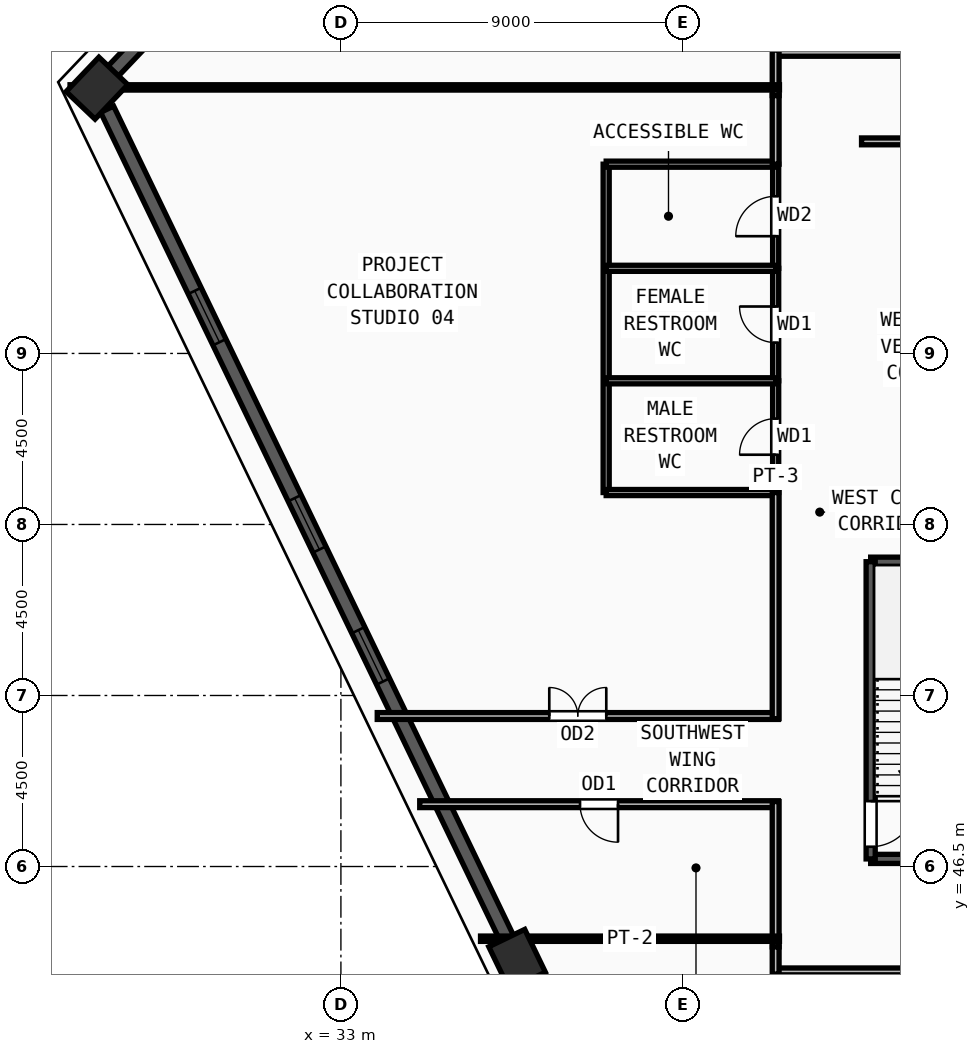
"""IFC4 building model, lengths in metres.
Left out: names, types, materials, properties, quantities, classifications, styles, units other than length and angle.
Written with IfcOpenShell. Run it as: python <this file> out.ifc"""

import sys

from ifc_helpers import new_model, si_unit, direction, frame, frame_2d, origin, origin_2d, place, context, subcontext, project, spatial, rectangle, extrude, source, transform, mapped, element, fill, save


model = new_model("IFC4")
c1 = context("Model", 3, precision=1e-05, world=origin(), true_north=direction((0.0, 1.0)))
c2 = subcontext(c1, "Body", "Model", "MODEL_VIEW")
j1 = project(units=[si_unit("LENGTHUNIT", "METRE"), si_unit("PLANEANGLEUNIT", "RADIAN")], contexts=[c1])
p1 = place(None, origin())
s1 = spatial("IfcSite", under=j1, at=p1, CompositionType="ELEMENT")
p2 = place(p1, origin())
s2 = spatial("IfcBuilding", under=s1, at=p2, CompositionType="ELEMENT")
p3 = place(p2, frame((0.0, 0.0, 213.0)))
s3 = spatial("IfcBuildingStorey", under=s2, at=p3, CompositionType="ELEMENT", Elevation=213.0)
m1 = source(origin(), c2, "Body", "SweptSolid", [
    extrude(rectangle(XDim=1.25, YDim=1.05, at=origin_2d()), origin(), (0.0, 0.0, 1.0), 3.75),
])
for number, where, z_axis, x_axis in (
    (1, (37.636, 44.054, 0.0), (0.0, 0.0, 1.0), (-0.434, 0.901, 0.0)),
    (2, (26.581, 66.98, 0.0), (0.0, 0.0, 1.0), (0.689, 0.724, 0.0)),
):
    element("IfcColumn", number, at=place(p3, frame(where, z_axis=z_axis, x_axis=x_axis)), inside=s3, PredefinedType="COLUMN", context=c2, shape_type="MappedRepresentation", body=[
        mapped(m1, transform((0.0, 0.0, 0.0), x_axis=(1.0, 0.0, 0.0), y_axis=(0.0, 1.0, 0.0), z_axis=(0.0, 0.0, 1.0), scale=1.0)),
    ])
p4 = place(p3, frame((30.035, 70.609, 0.0), z_axis=(0.0, 0.0, 1.0), x_axis=(-0.689503947634, -0.724281924527, 0.0)))
e3 = element("IfcWall", 3, at=p4, inside=s3, PredefinedType="SOLIDWALL", context=c2, shape_type="SweptSolid", body=[
    extrude(rectangle(XDim=4.395, YDim=0.38, at=frame_2d((2.197, 0.0))), origin(), (0.0, 0.0, 1.0), 3.57),
])
m2 = source(origin(), c2, "Body", "SweptSolid", [
    extrude(rectangle(XDim=1.2, YDim=1.9, at=frame_2d((0.6, 0.95))), frame((0.0, 0.2, 0.0), z_axis=(0.0, -1.0, 0.0), x_axis=(1.0, 0.0, 0.0)), (0.0, 0.0, 1.0), 0.4),
])
p5 = place(p4, frame((1.597, 0.0, 0.55)))
e4 = element("IfcOpeningElement", 4, at=p5, cuts=e3, PredefinedType="OPENING", context=c2, shape_type="MappedRepresentation", body=[
    mapped(m2, transform((0.0, 0.0, 0.0), x_axis=(1.0, 0.0, 0.0), y_axis=(0.0, 1.0, 0.0), z_axis=(0.0, 0.0, 1.0), scale=1.0)),
])
p6 = place(p3, frame((26.848, 66.426, 0.0), z_axis=(0.0, 0.0, 1.0), x_axis=(0.434351028037, -0.900743684099, 0.0)))
e5 = element("IfcWall", 5, at=p6, inside=s3, PredefinedType="SOLIDWALL", context=c2, shape_type="SweptSolid", body=[
    extrude(rectangle(XDim=24.222, YDim=0.38, at=frame_2d((12.111, 0.0))), origin(), (0.0, 0.0, 1.0), 3.57),
])
m3 = source(origin(), c2, "Body", "SweptSolid", [
    extrude(rectangle(XDim=1.5, YDim=1.9, at=frame_2d((0.75, 0.95))), frame((0.0, 0.2, 0.0), z_axis=(0.0, -1.0, 0.0), x_axis=(1.0, 0.0, 0.0)), (0.0, 0.0, 1.0), 0.4),
])
p7 = place(p6, frame((5.306, 0.0, 0.55)))
e6 = element("IfcOpeningElement", 6, at=p7, cuts=e5, PredefinedType="OPENING", context=c2, shape_type="MappedRepresentation", body=[
    mapped(m3, transform((0.0, 0.0, 0.0), x_axis=(1.0, 0.0, 0.0), y_axis=(0.0, 1.0, 0.0), z_axis=(0.0, 0.0, 1.0), scale=1.0)),
])
p8 = place(p6, frame((11.361, 0.0, 0.55)))
e7 = element("IfcOpeningElement", 7, at=p8, cuts=e5, PredefinedType="OPENING", context=c2, shape_type="MappedRepresentation", body=[
    mapped(m3, transform((0.0, 0.0, 0.0), x_axis=(1.0, 0.0, 0.0), y_axis=(0.0, 1.0, 0.0), z_axis=(0.0, 0.0, 1.0), scale=1.0)),
])
p9 = place(p6, frame((15.217, 0.0, 0.55)))
e8 = element("IfcOpeningElement", 8, at=p9, cuts=e5, PredefinedType="OPENING", context=c2, shape_type="MappedRepresentation", body=[
    mapped(m3, transform((0.0, 0.0, 0.0), x_axis=(1.0, 0.0, 0.0), y_axis=(0.0, 1.0, 0.0), z_axis=(0.0, 0.0, 1.0), scale=1.0)),
])
for number, where, z_axis, x_axis in (
    (9, (46.94, 46.7, 0.0), (0.0, 0.0, 1.0), (1.0, 0.0, 0.0)),
    (10, (50.38, 54.52, 0.0), (0.0, 0.0, 1.0), (-1.0, 0.0, 0.0)),
):
    element("IfcWall", number, at=place(p3, frame(where, z_axis=z_axis, x_axis=x_axis)), inside=s3, PredefinedType="SOLIDWALL", context=c2, shape_type="SweptSolid", body=[
        extrude(rectangle(XDim=3.44, YDim=0.24, at=frame_2d((1.72, 0.0))), origin(), (0.0, 0.0, 1.0), 3.57),
    ])
p10 = place(p3, frame((46.94, 54.52, 0.0), z_axis=(0.0, 0.0, 1.0), x_axis=(0.0, -1.0, 0.0)))
e11 = element("IfcWall", 11, at=p10, inside=s3, PredefinedType="SOLIDWALL", context=c2, shape_type="SweptSolid", body=[
    extrude(rectangle(XDim=7.82, YDim=0.24, at=frame_2d((3.91, 0.0))), origin(), (0.0, 0.0, 1.0), 3.57),
])
m4 = source(origin(), c2, "Body", "SweptSolid", [
    extrude(rectangle(XDim=1.2, YDim=2.2, at=frame_2d((0.6, 1.1))), frame((0.0, 0.13, 0.0), z_axis=(0.0, -1.0, 0.0), x_axis=(1.0, 0.0, 0.0)), (0.0, 0.0, 1.0), 0.26),
])
p11 = place(p10, frame((6.3, 0.0, 0.0)))
e12 = element("IfcOpeningElement", 12, at=p11, cuts=e11, PredefinedType="OPENING", context=c2, shape_type="MappedRepresentation", body=[
    mapped(m4, transform((0.0, 0.0, 0.0), x_axis=(1.0, 0.0, 0.0), y_axis=(0.0, 1.0, 0.0), z_axis=(0.0, 0.0, 1.0), scale=1.0)),
])
p12 = place(p3, frame((44.44, 56.34, 0.0), z_axis=(0.0, 0.0, 1.0), x_axis=(0.0, 1.0, 0.0)))
e13 = element("IfcWall", 13, at=p12, inside=s3, PredefinedType="PARTITIONING", context=c2, shape_type="SweptSolid", body=[
    extrude(rectangle(XDim=2.94, YDim=0.16, at=frame_2d((1.47, 0.0))), origin(), (0.0, 0.0, 1.0), 3.57),
])
m5 = source(origin(), c2, "Body", "SweptSolid", [
    extrude(rectangle(XDim=0.95, YDim=2.15, at=frame_2d((0.475, 1.075))), frame((0.0, 0.09, 0.0), z_axis=(0.0, -1.0, 0.0), x_axis=(1.0, 0.0, 0.0)), (0.0, 0.0, 1.0), 0.18),
])
p13 = place(p12, frame((0.995, 0.0, 0.0)))
e14 = element("IfcOpeningElement", 14, at=p13, cuts=e13, PredefinedType="OPENING", context=c2, shape_type="MappedRepresentation", body=[
    mapped(m5, transform((0.0, 0.0, 0.0), x_axis=(1.0, 0.0, 0.0), y_axis=(0.0, 1.0, 0.0), z_axis=(0.0, 0.0, 1.0), scale=1.0)),
])
p14 = place(p3, frame((44.44, 59.28, 0.0), z_axis=(0.0, 0.0, 1.0), x_axis=(0.0, 1.0, 0.0)))
e15 = element("IfcWall", 15, at=p14, inside=s3, PredefinedType="PARTITIONING", context=c2, shape_type="SweptSolid", body=[
    extrude(rectangle(XDim=2.96, YDim=0.16, at=frame_2d((1.48, 0.0))), origin(), (0.0, 0.0, 1.0), 3.57),
])
p15 = place(p14, frame((1.005, 0.0, 0.0)))
e16 = element("IfcOpeningElement", 16, at=p15, cuts=e15, PredefinedType="OPENING", context=c2, shape_type="MappedRepresentation", body=[
    mapped(m5, transform((0.0, 0.0, 0.0), x_axis=(1.0, 0.0, 0.0), y_axis=(0.0, 1.0, 0.0), z_axis=(0.0, 0.0, 1.0), scale=1.0)),
])
p16 = place(p3, frame((44.44, 62.24, 0.0), z_axis=(0.0, 0.0, 1.0), x_axis=(0.0, 1.0, 0.0)))
e17 = element("IfcWall", 17, at=p16, inside=s3, PredefinedType="PARTITIONING", context=c2, shape_type="SweptSolid", body=[
    extrude(rectangle(XDim=2.74, YDim=0.16, at=frame_2d((1.37, 0.0))), origin(), (0.0, 0.0, 1.0), 3.57),
])
m6 = source(origin(), c2, "Body", "SweptSolid", [
    extrude(rectangle(XDim=1.05, YDim=2.15, at=frame_2d((0.525, 1.075))), frame((0.0, 0.09, 0.0), z_axis=(0.0, -1.0, 0.0), x_axis=(1.0, 0.0, 0.0)), (0.0, 0.0, 1.0), 0.18),
])
p17 = place(p16, frame((0.845, 0.0, 0.0)))
e18 = element("IfcOpeningElement", 18, at=p17, cuts=e17, PredefinedType="OPENING", context=c2, shape_type="MappedRepresentation", body=[
    mapped(m6, transform((0.0, 0.0, 0.0), x_axis=(1.0, 0.0, 0.0), y_axis=(0.0, 1.0, 0.0), z_axis=(0.0, 0.0, 1.0), scale=1.0)),
])
p18 = place(p3, frame((46.7, 65.58, 0.0), z_axis=(0.0, 0.0, 1.0), x_axis=(1.0, 0.0, 0.0)))
e19 = element("IfcWall", 19, at=p18, inside=s3, PredefinedType="PARTITIONING", context=c2, shape_type="SweptSolid", body=[
    extrude(rectangle(XDim=3.84, YDim=0.18, at=frame_2d((1.92, 0.0))), origin(), (0.0, 0.0, 1.0), 3.57),
])
m7 = source(origin(), c2, "Body", "SweptSolid", [
    extrude(rectangle(XDim=1.3, YDim=2.2, at=frame_2d((0.65, 1.1))), frame((0.0, 0.1, 0.0), z_axis=(0.0, -1.0, 0.0), x_axis=(1.0, 0.0, 0.0)), (0.0, 0.0, 1.0), 0.2),
])
p19 = place(p18, frame((1.27, 0.0, 0.0)))
e20 = element("IfcOpeningElement", 20, at=p19, cuts=e19, PredefinedType="OPENING", context=c2, shape_type="MappedRepresentation", body=[
    mapped(m7, transform((0.0, 0.0, 0.0), x_axis=(1.0, 0.0, 0.0), y_axis=(0.0, 1.0, 0.0), z_axis=(0.0, 0.0, 1.0), scale=1.0)),
])
p20 = place(p3, frame((44.37, 67.91, 0.0), z_axis=(0.0, 0.0, 1.0), x_axis=(1.0, 0.0, 0.0)))
e21 = element("IfcWall", 21, at=p20, inside=s3, PredefinedType="PARTITIONING", context=c2, shape_type="SweptSolid", body=[
    extrude(rectangle(XDim=18.84, YDim=0.18, at=frame_2d((9.42, 0.0))), origin(), (0.0, 0.0, 1.0), 3.57),
])
m8 = source(origin(), c2, "Body", "SweptSolid", [
    extrude(rectangle(XDim=1.5, YDim=2.2, at=frame_2d((0.75, 1.1))), frame((0.0, 0.1, 0.0), z_axis=(0.0, -1.0, 0.0), x_axis=(1.0, 0.0, 0.0)), (0.0, 0.0, 1.0), 0.2),
])
p21 = place(p20, frame((8.67, 0.0, 0.0)))
e22 = element("IfcOpeningElement", 22, at=p21, cuts=e21, PredefinedType="OPENING", context=c2, shape_type="MappedRepresentation", body=[
    mapped(m8, transform((0.0, 0.0, 0.0), x_axis=(1.0, 0.0, 0.0), y_axis=(0.0, 1.0, 0.0), z_axis=(0.0, 0.0, 1.0), scale=1.0)),
])
p22 = place(p3, frame((33.956, 50.46, 0.0), z_axis=(0.0, 0.0, 1.0), x_axis=(1.0, 0.0, 0.0)))
e23 = element("IfcWall", 23, at=p22, inside=s3, PredefinedType="PARTITIONING", context=c2, shape_type="SweptSolid", body=[
    extrude(rectangle(XDim=10.554, YDim=0.18, at=frame_2d((5.277, 0.0))), origin(), (0.0, 0.0, 1.0), 3.57),
])
p23 = place(p22, frame((4.527, 0.0, 0.0)))
e24 = element("IfcOpeningElement", 24, at=p23, cuts=e23, PredefinedType="OPENING", context=c2, shape_type="MappedRepresentation", body=[
    mapped(m8, transform((0.0, 0.0, 0.0), x_axis=(1.0, 0.0, 0.0), y_axis=(0.0, 1.0, 0.0), z_axis=(0.0, 0.0, 1.0), scale=1.0)),
])
p24 = place(p3, frame((44.51, 48.14, 0.0), z_axis=(0.0, 0.0, 1.0), x_axis=(-1.0, 0.0, 0.0)))
e25 = element("IfcWall", 25, at=p24, inside=s3, PredefinedType="PARTITIONING", context=c2, shape_type="SweptSolid", body=[
    extrude(rectangle(XDim=9.436, YDim=0.18, at=frame_2d((4.718, 0.0))), origin(), (0.0, 0.0, 1.0), 3.57),
])
m9 = source(origin(), c2, "Body", "SweptSolid", [
    extrude(rectangle(XDim=1.0, YDim=2.2, at=frame_2d((0.5, 1.1))), frame((0.0, 0.1, 0.0), z_axis=(0.0, -1.0, 0.0), x_axis=(1.0, 0.0, 0.0)), (0.0, 0.0, 1.0), 0.2),
])
p25 = place(p24, frame((4.218, 0.0, 0.0)))
e26 = element("IfcOpeningElement", 26, at=p25, cuts=e25, PredefinedType="OPENING", context=c2, shape_type="MappedRepresentation", body=[
    mapped(m9, transform((0.0, 0.0, 0.0), x_axis=(1.0, 0.0, 0.0), y_axis=(0.0, 1.0, 0.0), z_axis=(0.0, 0.0, 1.0), scale=1.0)),
])
p26 = place(p3, frame((54.215, 43.74, 0.0), z_axis=(0.0, 0.0, 1.0), x_axis=(-1.0, 0.0, 0.0)))
e27 = element("IfcWall", 27, at=p26, inside=s3, PredefinedType="PARTITIONING", context=c2, shape_type="SweptSolid", body=[
    extrude(rectangle(XDim=9.845, YDim=0.18, at=frame_2d((4.922, 0.0))), origin(), (0.0, 0.0, 1.0), 3.57),
])
p27 = place(p26, frame((4.173, 0.0, 0.0)))
e28 = element("IfcOpeningElement", 28, at=p27, cuts=e27, PredefinedType="OPENING", context=c2, shape_type="MappedRepresentation", body=[
    mapped(m8, transform((0.0, 0.0, 0.0), x_axis=(1.0, 0.0, 0.0), y_axis=(0.0, 1.0, 0.0), z_axis=(0.0, 0.0, 1.0), scale=1.0)),
])
p28 = place(p3, frame((39.98, 56.34, 0.0), z_axis=(0.0, 0.0, 1.0), x_axis=(0.0, 1.0, 0.0)))
e29 = element("IfcWall", 29, at=p28, inside=s3, PredefinedType="PARTITIONING", context=c2, shape_type="SweptSolid", body=[
    extrude(rectangle(XDim=8.64, YDim=0.16, at=frame_2d((4.32, 0.0))), origin(), (0.0, 0.0, 1.0), 3.57),
])
for number, where, z_axis, x_axis in (
    (30, (39.98, 56.34, 0.0), (0.0, 0.0, 1.0), (1.0, 0.0, 0.0)),
    (31, (39.98, 59.28, 0.0), (0.0, 0.0, 1.0), (1.0, 0.0, 0.0)),
    (32, (39.98, 62.24, 0.0), (0.0, 0.0, 1.0), (1.0, 0.0, 0.0)),
    (33, (39.98, 64.98, 0.0), (0.0, 0.0, 1.0), (1.0, 0.0, 0.0)),
):
    element("IfcWall", number, at=place(p3, frame(where, z_axis=z_axis, x_axis=x_axis)), inside=s3, PredefinedType="PARTITIONING", context=c2, shape_type="SweptSolid", body=[
        extrude(rectangle(XDim=4.46, YDim=0.16, at=frame_2d((2.23, 0.0))), origin(), (0.0, 0.0, 1.0), 3.57),
    ])
p29 = place(p3, frame((44.44, 66.785, 0.0), z_axis=(0.0, 0.0, 1.0), x_axis=(0.0, 1.0, 0.0)))
e34 = element("IfcWall", 34, at=p29, inside=s3, PredefinedType="PARTITIONING", context=c2, shape_type="SweptSolid", body=[
    extrude(rectangle(XDim=1.195, YDim=0.18, at=frame_2d((0.598, 0.0))), origin(), (0.0, 0.0, 1.0), 3.57),
])
p30 = place(p3, frame((44.44, 50.39, 0.0), z_axis=(0.0, 0.0, 1.0), x_axis=(0.0, 1.0, 0.0)))
e35 = element("IfcWall", 35, at=p30, inside=s3, PredefinedType="PARTITIONING", context=c2, shape_type="SweptSolid", body=[
    extrude(rectangle(XDim=5.95, YDim=0.18, at=frame_2d((2.975, 0.0))), origin(), (0.0, 0.0, 1.0), 3.57),
])
p31 = place(p3, frame((44.44, 64.98, 0.0), z_axis=(0.0, 0.0, 1.0), x_axis=(0.0, 1.0, 0.0)))
e36 = element("IfcWall", 36, at=p31, inside=s3, PredefinedType="PARTITIONING", context=c2, shape_type="SweptSolid", body=[
    extrude(rectangle(XDim=1.805, YDim=0.18, at=frame_2d((0.902, 0.0))), origin(), (0.0, 0.0, 1.0), 3.57),
])
p32 = place(p3, frame((44.44, 44.385, 0.0), z_axis=(0.0, 0.0, 1.0), x_axis=(0.0, 1.0, 0.0)))
e37 = element("IfcWall", 37, at=p32, inside=s3, PredefinedType="PARTITIONING", context=c2, shape_type="SweptSolid", body=[
    extrude(rectangle(XDim=3.825, YDim=0.18, at=frame_2d((1.913, 0.0))), origin(), (0.0, 0.0, 1.0), 3.57),
])
p33 = place(p3, frame((44.44, 43.67, 0.0), z_axis=(0.0, 0.0, 1.0), x_axis=(0.0, 1.0, 0.0)))
e38 = element("IfcWall", 38, at=p33, inside=s3, PredefinedType="PARTITIONING", context=c2, shape_type="SweptSolid", body=[
    extrude(rectangle(XDim=0.715, YDim=0.18, at=frame_2d((0.357, 0.0))), origin(), (0.0, 0.0, 1.0), 3.57),
])
p34 = place(p3, frame((44.54, 44.6, 0.0), z_axis=(0.0, 0.0, 1.0), x_axis=(-1.0, 0.0, 0.0)))
e39 = element("IfcWall", 39, at=p34, inside=s3, PredefinedType="PARTITIONING", context=c2, shape_type="SweptSolid", body=[
    extrude(rectangle(XDim=7.866, YDim=0.14, at=frame_2d((3.933, 0.0))), origin(), (0.0, 0.0, 1.0), 3.57),
])
p35 = place(p3, frame((44.54, 67.0, 0.0), z_axis=(0.0, 0.0, 1.0), x_axis=(-1.0, 0.0, 0.0)))
e40 = element("IfcWall", 40, at=p35, inside=s3, PredefinedType="PARTITIONING", context=c2, shape_type="SweptSolid", body=[
    extrude(rectangle(XDim=18.668, YDim=0.14, at=frame_2d((9.334, 0.0))), origin(), (0.0, 0.0, 1.0), 2.855),
])
m10 = source(origin(), c2, "Body", "SweptSolid", [
    extrude(rectangle(XDim=1.5, YDim=1.9, at=frame_2d((0.75, 0.95))), frame((0.0, 0.03, 0.0), z_axis=(0.0, -1.0, 0.0), x_axis=(1.0, 0.0, 0.0)), (0.0, 0.0, 1.0), 0.06),
])
p36 = place(p7, origin())
e41 = element("IfcWindow", 41, at=p36, inside=s3, PartitioningType="DOUBLE_PANEL_VERTICAL", PredefinedType="WINDOW", context=c2, shape_type="MappedRepresentation", body=[
    mapped(m10, transform((0.0, 0.0, 0.0), x_axis=(1.0, 0.0, 0.0), y_axis=(0.0, 1.0, 0.0), z_axis=(0.0, 0.0, 1.0), scale=1.0)),
])
fill(e6, e41)
p37 = place(p8, origin())
e42 = element("IfcWindow", 42, at=p37, inside=s3, PartitioningType="DOUBLE_PANEL_VERTICAL", PredefinedType="WINDOW", context=c2, shape_type="MappedRepresentation", body=[
    mapped(m10, transform((0.0, 0.0, 0.0), x_axis=(1.0, 0.0, 0.0), y_axis=(0.0, 1.0, 0.0), z_axis=(0.0, 0.0, 1.0), scale=1.0)),
])
fill(e7, e42)
p38 = place(p9, origin())
e43 = element("IfcWindow", 43, at=p38, inside=s3, PartitioningType="DOUBLE_PANEL_VERTICAL", PredefinedType="WINDOW", context=c2, shape_type="MappedRepresentation", body=[
    mapped(m10, transform((0.0, 0.0, 0.0), x_axis=(1.0, 0.0, 0.0), y_axis=(0.0, 1.0, 0.0), z_axis=(0.0, 0.0, 1.0), scale=1.0)),
])
fill(e8, e43)
m11 = source(origin(), c2, "Body", "SweptSolid", [
    extrude(rectangle(XDim=1.2, YDim=2.2, at=frame_2d((0.6, 1.1))), frame((0.0, 0.025, 0.0), z_axis=(0.0, -1.0, 0.0), x_axis=(1.0, 0.0, 0.0)), (0.0, 0.0, 1.0), 0.05),
])
p39 = place(p11, origin())
e44 = element("IfcDoor", 44, at=p39, inside=s3, OperationType="SINGLE_SWING_LEFT", PredefinedType="DOOR", context=c2, shape_type="MappedRepresentation", body=[
    mapped(m11, transform((0.0, 0.0, 0.0), x_axis=(1.0, 0.0, 0.0), y_axis=(0.0, 1.0, 0.0), z_axis=(0.0, 0.0, 1.0), scale=1.0)),
])
fill(e12, e44)
m12 = source(origin(), c2, "Body", "SweptSolid", [
    extrude(rectangle(XDim=0.95, YDim=2.15, at=frame_2d((0.475, 1.075))), frame((0.0, 0.025, 0.0), z_axis=(0.0, -1.0, 0.0), x_axis=(1.0, 0.0, 0.0)), (0.0, 0.0, 1.0), 0.05),
])
p40 = place(p13, origin())
e45 = element("IfcDoor", 45, at=p40, inside=s3, OperationType="SINGLE_SWING_LEFT", PredefinedType="DOOR", context=c2, shape_type="MappedRepresentation", body=[
    mapped(m12, transform((0.0, 0.0, 0.0), x_axis=(1.0, 0.0, 0.0), y_axis=(0.0, 1.0, 0.0), z_axis=(0.0, 0.0, 1.0), scale=1.0)),
])
fill(e14, e45)
p41 = place(p15, origin())
e46 = element("IfcDoor", 46, at=p41, inside=s3, OperationType="SINGLE_SWING_RIGHT", PredefinedType="DOOR", context=c2, shape_type="MappedRepresentation", body=[
    mapped(m12, transform((0.0, 0.0, 0.0), x_axis=(1.0, 0.0, 0.0), y_axis=(0.0, 1.0, 0.0), z_axis=(0.0, 0.0, 1.0), scale=1.0)),
])
fill(e16, e46)
m13 = source(origin(), c2, "Body", "SweptSolid", [
    extrude(rectangle(XDim=1.05, YDim=2.15, at=frame_2d((0.525, 1.075))), frame((0.0, 0.025, 0.0), z_axis=(0.0, -1.0, 0.0), x_axis=(1.0, 0.0, 0.0)), (0.0, 0.0, 1.0), 0.05),
])
p42 = place(p17, origin())
e47 = element("IfcDoor", 47, at=p42, inside=s3, OperationType="SINGLE_SWING_LEFT", PredefinedType="DOOR", context=c2, shape_type="MappedRepresentation", body=[
    mapped(m13, transform((0.0, 0.0, 0.0), x_axis=(1.0, 0.0, 0.0), y_axis=(0.0, 1.0, 0.0), z_axis=(0.0, 0.0, 1.0), scale=1.0)),
])
fill(e18, e47)
m14 = source(origin(), c2, "Body", "SweptSolid", [
    extrude(rectangle(XDim=1.5, YDim=2.2, at=frame_2d((0.75, 1.1))), frame((0.0, 0.025, 0.0), z_axis=(0.0, -1.0, 0.0), x_axis=(1.0, 0.0, 0.0)), (0.0, 0.0, 1.0), 0.05),
])
p43 = place(p23, origin())
e48 = element("IfcDoor", 48, at=p43, inside=s3, OperationType="DOUBLE_DOOR_SINGLE_SWING", PredefinedType="DOOR", context=c2, shape_type="MappedRepresentation", body=[
    mapped(m14, transform((0.0, 0.0, 0.0), x_axis=(1.0, 0.0, 0.0), y_axis=(0.0, 1.0, 0.0), z_axis=(0.0, 0.0, 1.0), scale=1.0)),
])
fill(e24, e48)
m15 = source(origin(), c2, "Body", "SweptSolid", [
    extrude(rectangle(XDim=1.0, YDim=2.2, at=frame_2d((0.5, 1.1))), frame((0.0, 0.025, 0.0), z_axis=(0.0, -1.0, 0.0), x_axis=(1.0, 0.0, 0.0)), (0.0, 0.0, 1.0), 0.05),
])
p44 = place(p25, origin())
e49 = element("IfcDoor", 49, at=p44, inside=s3, OperationType="SINGLE_SWING_LEFT", PredefinedType="DOOR", context=c2, shape_type="MappedRepresentation", body=[
    mapped(m15, transform((0.0, 0.0, 0.0), x_axis=(1.0, 0.0, 0.0), y_axis=(0.0, 1.0, 0.0), z_axis=(0.0, 0.0, 1.0), scale=1.0)),
])
fill(e26, e49)
save(model, sys.argv[1])
